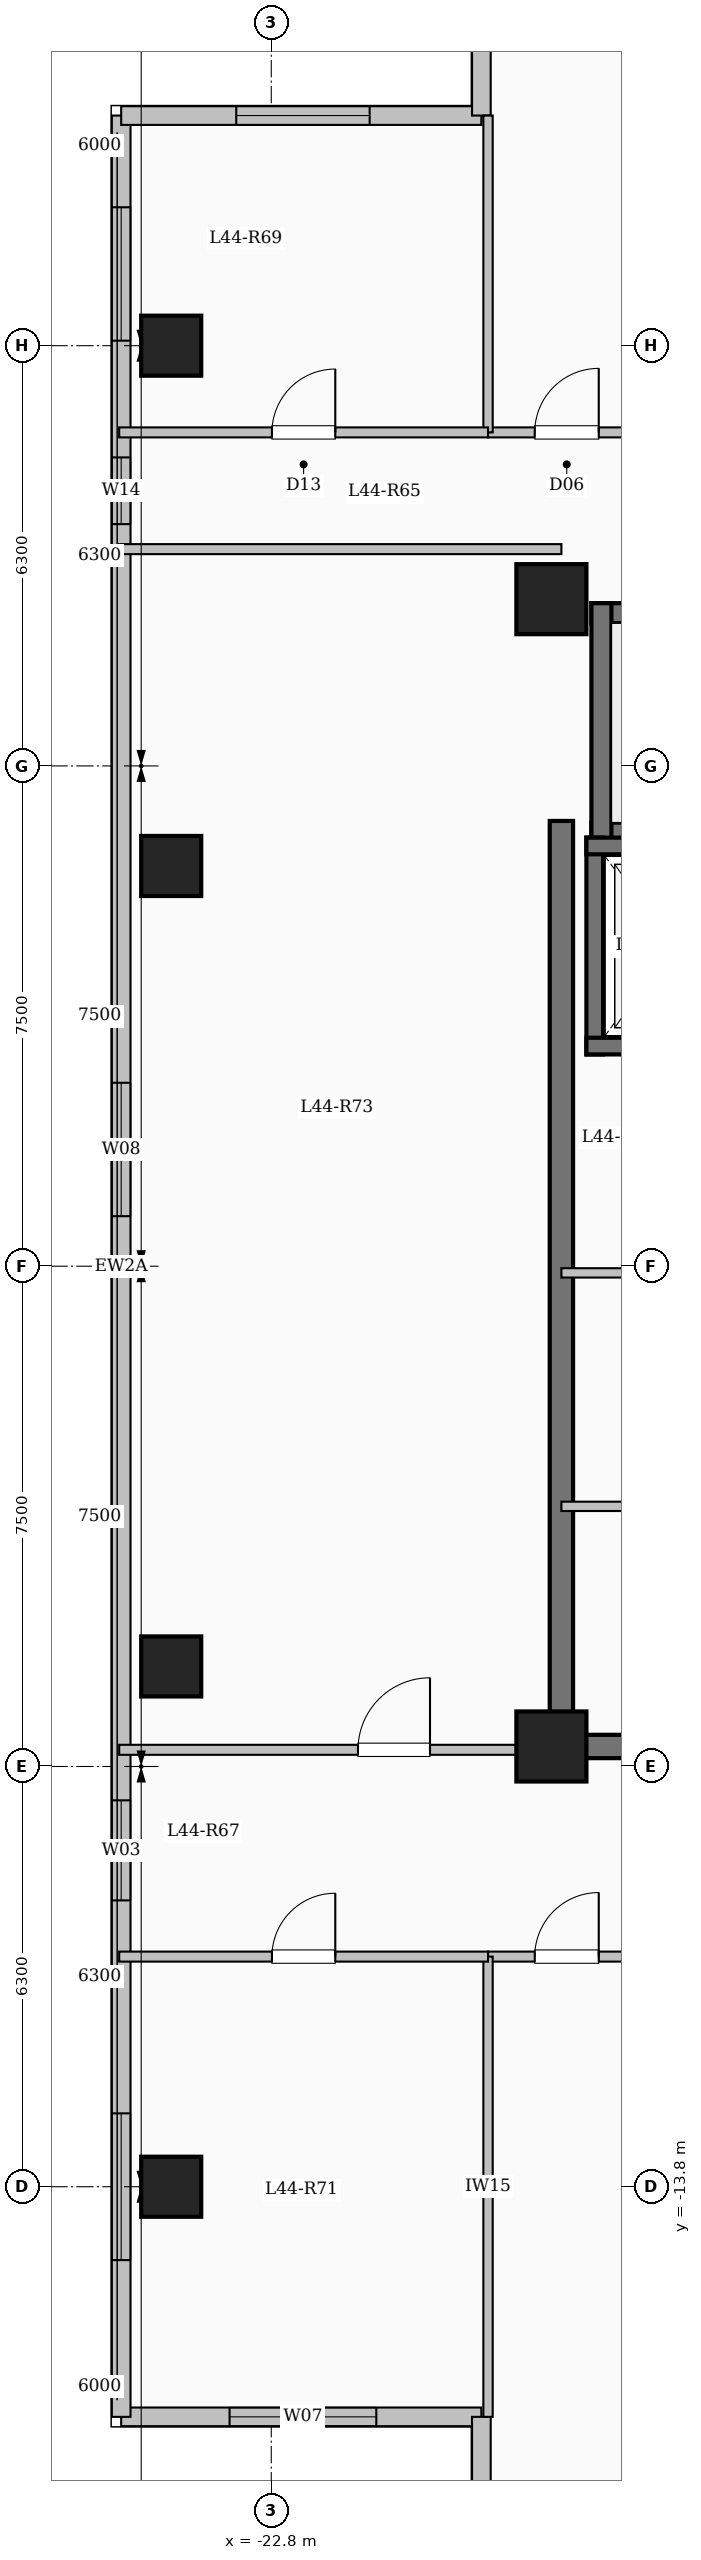
"""IFC4 building model, lengths in metres.
Left out: names, types, materials, properties, quantities, classifications, styles, units other than length and angle.
Written with IfcOpenShell. Run it as: python <this file> out.ifc"""

import sys

from ifc_helpers import new_model, si_unit, direction, frame, frame_2d, origin, origin_2d, place, context, subcontext, project, spatial, rectangle, extrude, element, fill, save


model = new_model("IFC4")
c1 = context("Model", 3, precision=1e-05, world=origin(), true_north=direction((0.0, 1.0)))
c2 = subcontext(c1, "Body", "Model", "MODEL_VIEW")
j1 = project(units=[si_unit("LENGTHUNIT", "METRE"), si_unit("PLANEANGLEUNIT", "RADIAN")], contexts=[c1])
p1 = place(None, origin())
s1 = spatial("IfcSite", under=j1, at=p1, CompositionType="ELEMENT")
p2 = place(p1, origin())
s2 = spatial("IfcBuilding", under=s1, at=p2, CompositionType="ELEMENT")
p3 = place(p2, frame((0.0, 0.0, 162.75)))
s3 = spatial("IfcBuildingStorey", under=s2, at=p3, CompositionType="ELEMENT", Elevation=162.75)
for number, where, z_axis, x_axis in (
    (1, (-18.6, -7.2, 0.0), (0.0, 0.0, 1.0), (1.0, 0.0, 0.0)),
    (2, (-18.6, 10.0, 0.0), (0.0, 0.0, 1.0), (1.0, 0.0, 0.0)),
):
    element("IfcColumn", number, at=place(p3, frame(where, z_axis=z_axis, x_axis=x_axis)), inside=s3, PredefinedType="COLUMN", context=c2, shape_type="SweptSolid", body=[
        extrude(rectangle(XDim=1.05, YDim=1.05, at=origin_2d()), origin(), (0.0, 0.0, 1.0), 3.35),
    ])
for number, where, z_axis, x_axis in (
    (3, (-24.3, -13.8, 0.0), (0.0, 0.0, 1.0), (1.0, 0.0, 0.0)),
    (4, (-24.3, -6.0, 0.0), (0.0, 0.0, 1.0), (1.0, 0.0, 0.0)),
    (5, (-24.3, 6.0, 0.0), (0.0, 0.0, 1.0), (1.0, 0.0, 0.0)),
    (6, (-24.3, 13.8, 0.0), (0.0, 0.0, 1.0), (1.0, 0.0, 0.0)),
):
    element("IfcColumn", number, at=place(p3, frame(where, z_axis=z_axis, x_axis=x_axis)), inside=s3, PredefinedType="COLUMN", context=c2, shape_type="SweptSolid", body=[
        extrude(rectangle(XDim=0.9, YDim=0.9, at=origin_2d()), origin(), (0.0, 0.0, 1.0), 3.35),
    ])
p4 = place(p3, frame((-19.65, -17.25, 0.0), z_axis=(0.0, 0.0, 1.0), x_axis=(-1.0, 0.0, 0.0)))
e7 = element("IfcWall", 7, at=p4, inside=s3, PredefinedType="SOLIDWALL", context=c2, shape_type="SweptSolid", body=[
    extrude(rectangle(XDim=5.4, YDim=0.28, at=frame_2d((2.7, 0.0))), origin(), (0.0, 0.0, 1.0), 3.1),
])
p5 = place(p4, frame((1.575, 0.0, 0.9)))
e8 = element("IfcOpeningElement", 8, at=p5, cuts=e7, PredefinedType="OPENING", context=c2, shape_type="SweptSolid", body=[
    extrude(rectangle(XDim=2.2, YDim=1.75, at=frame_2d((1.1, 0.875))), frame((0.0, 0.15, 0.0), z_axis=(0.0, -1.0, 0.0), x_axis=(1.0, 0.0, 0.0)), (0.0, 0.0, 1.0), 0.3),
])
p6 = place(p3, frame((-25.05, -17.25, 0.0), z_axis=(0.0, 0.0, 1.0), x_axis=(0.0, 1.0, 0.0)))
e9 = element("IfcWall", 9, at=p6, inside=s3, PredefinedType="SOLIDWALL", context=c2, shape_type="SweptSolid", body=[
    extrude(rectangle(XDim=34.5, YDim=0.28, at=frame_2d((17.25, 0.0))), origin(), (0.0, 0.0, 1.0), 3.1),
])
p7 = place(p6, frame((2.35, 0.0, 0.9)))
e10 = element("IfcOpeningElement", 10, at=p7, cuts=e9, PredefinedType="OPENING", context=c2, shape_type="SweptSolid", body=[
    extrude(rectangle(XDim=2.2, YDim=1.75, at=frame_2d((1.1, 0.875))), frame((0.0, 0.15, 0.0), z_axis=(0.0, -1.0, 0.0), x_axis=(1.0, 0.0, 0.0)), (0.0, 0.0, 1.0), 0.3),
])
p8 = place(p6, frame((7.742, 0.0, 0.9)))
e11 = element("IfcOpeningElement", 11, at=p8, cuts=e9, PredefinedType="OPENING", context=c2, shape_type="SweptSolid", body=[
    extrude(rectangle(XDim=1.5, YDim=1.65, at=frame_2d((0.75, 0.825))), frame((0.0, 0.15, 0.0), z_axis=(0.0, -1.0, 0.0), x_axis=(1.0, 0.0, 0.0)), (0.0, 0.0, 1.0), 0.3),
])
p9 = place(p6, frame((18.0, 0.0, 0.9)))
e12 = element("IfcOpeningElement", 12, at=p9, cuts=e9, PredefinedType="OPENING", context=c2, shape_type="SweptSolid", body=[
    extrude(rectangle(XDim=2.0, YDim=1.7, at=frame_2d((1.0, 0.85))), frame((0.0, 0.15, 0.0), z_axis=(0.0, -1.0, 0.0), x_axis=(1.0, 0.0, 0.0)), (0.0, 0.0, 1.0), 0.3),
])
p10 = place(p6, frame((28.375, 0.0, 0.95)))
e13 = element("IfcOpeningElement", 13, at=p10, cuts=e9, PredefinedType="OPENING", context=c2, shape_type="SweptSolid", body=[
    extrude(rectangle(XDim=1.0, YDim=1.5, at=frame_2d((0.5, 0.75))), frame((0.0, 0.15, 0.0), z_axis=(0.0, -1.0, 0.0), x_axis=(1.0, 0.0, 0.0)), (0.0, 0.0, 1.0), 0.3),
])
p11 = place(p6, frame((31.125, 0.0, 0.9)))
e14 = element("IfcOpeningElement", 14, at=p11, cuts=e9, PredefinedType="OPENING", context=c2, shape_type="SweptSolid", body=[
    extrude(rectangle(XDim=2.0, YDim=1.7, at=frame_2d((1.0, 0.85))), frame((0.0, 0.15, 0.0), z_axis=(0.0, -1.0, 0.0), x_axis=(1.0, 0.0, 0.0)), (0.0, 0.0, 1.0), 0.3),
])
p12 = place(p3, frame((-25.05, 17.25, 0.0), z_axis=(0.0, 0.0, 1.0), x_axis=(1.0, 0.0, 0.0)))
e15 = element("IfcWall", 15, at=p12, inside=s3, PredefinedType="SOLIDWALL", context=c2, shape_type="SweptSolid", body=[
    extrude(rectangle(XDim=5.4, YDim=0.28, at=frame_2d((2.7, 0.0))), origin(), (0.0, 0.0, 1.0), 3.1),
])
p13 = place(p12, frame((1.725, 0.0, 0.9)))
e16 = element("IfcOpeningElement", 16, at=p13, cuts=e15, PredefinedType="OPENING", context=c2, shape_type="SweptSolid", body=[
    extrude(rectangle(XDim=2.0, YDim=1.7, at=frame_2d((1.0, 0.85))), frame((0.0, 0.15, 0.0), z_axis=(0.0, -1.0, 0.0), x_axis=(1.0, 0.0, 0.0)), (0.0, 0.0, 1.0), 0.3),
])
p14 = place(p3, frame((-19.65, 17.25, 0.0), z_axis=(0.0, 0.0, 1.0), x_axis=(0.0, 1.0, 0.0)))
e17 = element("IfcWall", 17, at=p14, inside=s3, PredefinedType="SOLIDWALL", context=c2, shape_type="SweptSolid", body=[
    extrude(rectangle(XDim=3.9, YDim=0.28, at=frame_2d((1.95, 0.0))), origin(), (0.0, 0.0, 1.0), 3.1),
])
p15 = place(p14, frame((1.107, 0.0, 0.9)))
e18 = element("IfcOpeningElement", 18, at=p15, cuts=e17, PredefinedType="OPENING", context=c2, shape_type="SweptSolid", body=[
    extrude(rectangle(XDim=1.65, YDim=1.6, at=frame_2d((0.825, 0.8))), frame((0.0, 0.15, 0.0), z_axis=(0.0, -1.0, 0.0), x_axis=(1.0, 0.0, 0.0)), (0.0, 0.0, 1.0), 0.3),
])
p16 = place(p3, frame((-19.65, -21.15, 0.0), z_axis=(0.0, 0.0, 1.0), x_axis=(0.0, 1.0, 0.0)))
e19 = element("IfcWall", 19, at=p16, inside=s3, PredefinedType="SOLIDWALL", context=c2, shape_type="SweptSolid", body=[
    extrude(rectangle(XDim=3.9, YDim=0.28, at=frame_2d((1.95, 0.0))), origin(), (0.0, 0.0, 1.0), 3.1),
])
p17 = place(p16, frame((1.143, 0.0, 0.9)))
e20 = element("IfcOpeningElement", 20, at=p17, cuts=e19, PredefinedType="OPENING", context=c2, shape_type="SweptSolid", body=[
    extrude(rectangle(XDim=1.65, YDim=1.6, at=frame_2d((0.825, 0.8))), frame((0.0, 0.15, 0.0), z_axis=(0.0, -1.0, 0.0), x_axis=(1.0, 0.0, 0.0)), (0.0, 0.0, 1.0), 0.3),
])
p18 = place(p3, frame((-18.0, 9.79, 0.0), z_axis=(0.0, 0.0, 1.0), x_axis=(1.0, 0.0, 0.0)))
e21 = element("IfcWall", 21, at=p18, inside=s3, PredefinedType="SHEAR", context=c2, shape_type="SweptSolid", body=[
    extrude(rectangle(XDim=8.0, YDim=0.3, at=frame_2d((4.0, 0.0))), origin(), (0.0, 0.0, 1.0), 3.35),
])
p19 = place(p3, frame((-18.0, 6.5, 0.0), z_axis=(0.0, 0.0, 1.0), x_axis=(1.0, 0.0, 0.0)))
e22 = element("IfcWall", 22, at=p19, inside=s3, PredefinedType="SHEAR", context=c2, shape_type="SweptSolid", body=[
    extrude(rectangle(XDim=8.0, YDim=0.3, at=frame_2d((4.0, 0.0))), origin(), (0.0, 0.0, 1.0), 3.35),
])
p20 = place(p19, frame((6.45, 0.0, 0.0)))
e23 = element("IfcOpeningElement", 23, at=p20, cuts=e22, PredefinedType="OPENING", context=c2, shape_type="SweptSolid", body=[
    extrude(rectangle(XDim=1.0, YDim=2.15, at=frame_2d((0.5, 1.075))), frame((0.0, 0.16, 0.0), z_axis=(0.0, -1.0, 0.0), x_axis=(1.0, 0.0, 0.0)), (0.0, 0.0, 1.0), 0.32),
])
p21 = place(p3, frame((-17.85, 6.35, 0.0), z_axis=(0.0, 0.0, 1.0), x_axis=(0.0, 1.0, 0.0)))
e24 = element("IfcWall", 24, at=p21, inside=s3, PredefinedType="SHEAR", context=c2, shape_type="SweptSolid", body=[
    extrude(rectangle(XDim=3.59, YDim=0.3, at=frame_2d((1.795, 0.0))), origin(), (0.0, 0.0, 1.0), 3.35),
])
p22 = place(p3, frame((-17.95, 3.175, 0.0), z_axis=(0.0, 0.0, 1.0), x_axis=(0.0, 1.0, 0.0)))
e25 = element("IfcWall", 25, at=p22, inside=s3, PredefinedType="SHEAR", context=c2, shape_type="SweptSolid", body=[
    extrude(rectangle(XDim=3.25, YDim=0.25, at=frame_2d((1.625, 0.0))), origin(), (0.0, 0.0, 1.0), 3.35),
])
for number, where, z_axis, x_axis in (
    (26, (-18.075, 3.3, 0.0), (0.0, 0.0, 1.0), (1.0, 0.0, 0.0)),
    (27, (-18.075, 6.3, 0.0), (0.0, 0.0, 1.0), (1.0, 0.0, 0.0)),
):
    element("IfcWall", number, at=place(p3, frame(where, z_axis=z_axis, x_axis=x_axis)), inside=s3, PredefinedType="SHEAR", context=c2, shape_type="SweptSolid", body=[
        extrude(rectangle(XDim=2.55, YDim=0.25, at=frame_2d((1.275, 0.0))), origin(), (0.0, 0.0, 1.0), 3.35),
    ])
p23 = place(p3, frame((-18.45, -7.375, 0.0), z_axis=(0.0, 0.0, 1.0), x_axis=(0.0, 1.0, 0.0)))
e28 = element("IfcWall", 28, at=p23, inside=s3, PredefinedType="SHEAR", context=c2, shape_type="SweptSolid", body=[
    extrude(rectangle(XDim=14.05, YDim=0.35, at=frame_2d((7.025, 0.0))), origin(), (0.0, 0.0, 1.0), 3.35),
])
p24 = place(p3, frame((-18.625, -7.2, 0.0), z_axis=(0.0, 0.0, 1.0), x_axis=(1.0, 0.0, 0.0)))
e29 = element("IfcWall", 29, at=p24, inside=s3, PredefinedType="SHEAR", context=c2, shape_type="SweptSolid", body=[
    extrude(rectangle(XDim=8.55, YDim=0.35, at=frame_2d((4.275, 0.0))), origin(), (0.0, 0.0, 1.0), 3.35),
])
p25 = place(p3, frame((-18.45, -3.6, 0.0), z_axis=(0.0, 0.0, 1.0), x_axis=(1.0, 0.0, 0.0)))
e30 = element("IfcWall", 30, at=p25, inside=s3, PredefinedType="PARTITIONING", context=c2, shape_type="SweptSolid", body=[
    extrude(rectangle(XDim=3.05, YDim=0.14, at=frame_2d((1.525, 0.0))), origin(), (0.0, 0.0, 1.0), 3.1),
])
p26 = place(p25, frame((1.05, 0.0, 0.0)))
e31 = element("IfcOpeningElement", 31, at=p26, cuts=e30, PredefinedType="OPENING", context=c2, shape_type="SweptSolid", body=[
    extrude(rectangle(XDim=0.9, YDim=2.08, at=frame_2d((0.45, 1.04))), frame((0.0, 0.08, 0.0), z_axis=(0.0, -1.0, 0.0), x_axis=(1.0, 0.0, 0.0)), (0.0, 0.0, 1.0), 0.16),
])
p27 = place(p3, frame((-18.45, -0.1, 0.0), z_axis=(0.0, 0.0, 1.0), x_axis=(1.0, 0.0, 0.0)))
e32 = element("IfcWall", 32, at=p27, inside=s3, PredefinedType="PARTITIONING", context=c2, shape_type="SweptSolid", body=[
    extrude(rectangle(XDim=3.05, YDim=0.14, at=frame_2d((1.525, 0.0))), origin(), (0.0, 0.0, 1.0), 3.1),
])
p28 = place(p27, frame((1.05, 0.0, 0.0)))
e33 = element("IfcOpeningElement", 33, at=p28, cuts=e32, PredefinedType="OPENING", context=c2, shape_type="SweptSolid", body=[
    extrude(rectangle(XDim=0.9, YDim=2.08, at=frame_2d((0.45, 1.04))), frame((0.0, 0.08, 0.0), z_axis=(0.0, -1.0, 0.0), x_axis=(1.0, 0.0, 0.0)), (0.0, 0.0, 1.0), 0.16),
])
p29 = place(p3, frame((-19.55, 12.5, 0.0), z_axis=(0.0, 0.0, 1.0), x_axis=(1.0, 0.0, 0.0)))
e34 = element("IfcWall", 34, at=p29, inside=s3, PredefinedType="PARTITIONING", context=c2, shape_type="SweptSolid", body=[
    extrude(rectangle(XDim=15.7, YDim=0.15, at=frame_2d((7.85, 0.0))), origin(), (0.0, 0.0, 1.0), 3.1),
])
p30 = place(p29, frame((0.7, 0.0, 0.0)))
e35 = element("IfcOpeningElement", 35, at=p30, cuts=e34, PredefinedType="OPENING", context=c2, shape_type="SweptSolid", body=[
    extrude(rectangle(XDim=0.96, YDim=2.15, at=frame_2d((0.48, 1.075))), frame((0.0, 0.085, 0.0), z_axis=(0.0, -1.0, 0.0), x_axis=(1.0, 0.0, 0.0)), (0.0, 0.0, 1.0), 0.17),
])
p31 = place(p3, frame((-19.55, -10.35, 0.0), z_axis=(0.0, 0.0, 1.0), x_axis=(1.0, 0.0, 0.0)))
e36 = element("IfcWall", 36, at=p31, inside=s3, PredefinedType="PARTITIONING", context=c2, shape_type="SweptSolid", body=[
    extrude(rectangle(XDim=11.0, YDim=0.15, at=frame_2d((5.5, 0.0))), origin(), (0.0, 0.0, 1.0), 3.1),
])
p32 = place(p31, frame((0.7, 0.0, 0.0)))
e37 = element("IfcOpeningElement", 37, at=p32, cuts=e36, PredefinedType="OPENING", context=c2, shape_type="SweptSolid", body=[
    extrude(rectangle(XDim=0.96, YDim=2.15, at=frame_2d((0.48, 1.075))), frame((0.0, 0.085, 0.0), z_axis=(0.0, -1.0, 0.0), x_axis=(1.0, 0.0, 0.0)), (0.0, 0.0, 1.0), 0.17),
])
p33 = place(p3, frame((-25.08, -7.25, 0.0), z_axis=(0.0, 0.0, 1.0), x_axis=(1.0, 0.0, 0.0)))
e38 = element("IfcWall", 38, at=p33, inside=s3, PredefinedType="PARTITIONING", context=c2, shape_type="SweptSolid", body=[
    extrude(rectangle(XDim=6.63, YDim=0.15, at=frame_2d((3.315, 0.0))), origin(), (0.0, 0.0, 1.0), 3.1),
])
p34 = place(p33, frame((3.58, 0.0, 0.0)))
e39 = element("IfcOpeningElement", 39, at=p34, cuts=e38, PredefinedType="OPENING", context=c2, shape_type="SweptSolid", body=[
    extrude(rectangle(XDim=1.08, YDim=2.15, at=frame_2d((0.54, 1.075))), frame((0.0, 0.085, 0.0), z_axis=(0.0, -1.0, 0.0), x_axis=(1.0, 0.0, 0.0)), (0.0, 0.0, 1.0), 0.17),
])
p35 = place(p3, frame((-25.08, 10.75, 0.0), z_axis=(0.0, 0.0, 1.0), x_axis=(1.0, 0.0, 0.0)))
e40 = element("IfcWall", 40, at=p35, inside=s3, PredefinedType="PARTITIONING", context=c2, shape_type="SweptSolid", body=[
    extrude(rectangle(XDim=6.63, YDim=0.15, at=frame_2d((3.315, 0.0))), origin(), (0.0, 0.0, 1.0), 3.1),
])
p36 = place(p3, frame((-19.55, -17.25, 0.0), z_axis=(0.0, 0.0, 1.0), x_axis=(0.0, 1.0, 0.0)))
e41 = element("IfcWall", 41, at=p36, inside=s3, PredefinedType="PARTITIONING", context=c2, shape_type="SweptSolid", body=[
    extrude(rectangle(XDim=6.9, YDim=0.14, at=frame_2d((3.45, 0.0))), origin(), (0.0, 0.0, 1.0), 3.1),
])
p37 = place(p3, frame((-19.55, 12.5, 0.0), z_axis=(0.0, 0.0, 1.0), x_axis=(0.0, 1.0, 0.0)))
e42 = element("IfcWall", 42, at=p37, inside=s3, PredefinedType="PARTITIONING", context=c2, shape_type="SweptSolid", body=[
    extrude(rectangle(XDim=4.75, YDim=0.14, at=frame_2d((2.375, 0.0))), origin(), (0.0, 0.0, 1.0), 3.1),
])
p38 = place(p3, frame((-25.08, 12.5, 0.0), z_axis=(0.0, 0.0, 1.0), x_axis=(1.0, 0.0, 0.0)))
e43 = element("IfcWall", 43, at=p38, inside=s3, PredefinedType="PARTITIONING", context=c2, shape_type="SweptSolid", body=[
    extrude(rectangle(XDim=5.53, YDim=0.15, at=frame_2d((2.765, 0.0))), origin(), (0.0, 0.0, 1.0), 3.1),
])
p39 = place(p38, frame((2.29, 0.0, 0.0)))
e44 = element("IfcOpeningElement", 44, at=p39, cuts=e43, PredefinedType="OPENING", context=c2, shape_type="SweptSolid", body=[
    extrude(rectangle(XDim=0.95, YDim=2.15, at=frame_2d((0.475, 1.075))), frame((0.0, 0.085, 0.0), z_axis=(0.0, -1.0, 0.0), x_axis=(1.0, 0.0, 0.0)), (0.0, 0.0, 1.0), 0.17),
])
p40 = place(p3, frame((-25.08, -10.35, 0.0), z_axis=(0.0, 0.0, 1.0), x_axis=(1.0, 0.0, 0.0)))
e45 = element("IfcWall", 45, at=p40, inside=s3, PredefinedType="PARTITIONING", context=c2, shape_type="SweptSolid", body=[
    extrude(rectangle(XDim=5.53, YDim=0.15, at=frame_2d((2.765, 0.0))), origin(), (0.0, 0.0, 1.0), 3.1),
])
p41 = place(p40, frame((2.29, 0.0, 0.0)))
e46 = element("IfcOpeningElement", 46, at=p41, cuts=e45, PredefinedType="OPENING", context=c2, shape_type="SweptSolid", body=[
    extrude(rectangle(XDim=0.95, YDim=2.15, at=frame_2d((0.475, 1.075))), frame((0.0, 0.085, 0.0), z_axis=(0.0, -1.0, 0.0), x_axis=(1.0, 0.0, 0.0)), (0.0, 0.0, 1.0), 0.17),
])
p42 = place(p5, origin())
e47 = element("IfcWindow", 47, at=p42, inside=s3, PartitioningType="SINGLE_PANEL", PredefinedType="WINDOW", context=c2, shape_type="SweptSolid", body=[
    extrude(rectangle(XDim=2.2, YDim=1.75, at=frame_2d((1.1, 0.875))), frame((0.0, 0.03, 0.0), z_axis=(0.0, -1.0, 0.0), x_axis=(1.0, 0.0, 0.0)), (0.0, 0.0, 1.0), 0.06),
])
fill(e8, e47)
p43 = place(p7, origin())
e48 = element("IfcWindow", 48, at=p43, inside=s3, PartitioningType="SINGLE_PANEL", PredefinedType="WINDOW", context=c2, shape_type="SweptSolid", body=[
    extrude(rectangle(XDim=2.2, YDim=1.75, at=frame_2d((1.1, 0.875))), frame((0.0, 0.03, 0.0), z_axis=(0.0, -1.0, 0.0), x_axis=(1.0, 0.0, 0.0)), (0.0, 0.0, 1.0), 0.06),
])
fill(e10, e48)
p44 = place(p8, origin())
e49 = element("IfcWindow", 49, at=p44, inside=s3, PartitioningType="SINGLE_PANEL", PredefinedType="WINDOW", context=c2, shape_type="SweptSolid", body=[
    extrude(rectangle(XDim=1.5, YDim=1.65, at=frame_2d((0.75, 0.825))), frame((0.0, 0.03, 0.0), z_axis=(0.0, -1.0, 0.0), x_axis=(1.0, 0.0, 0.0)), (0.0, 0.0, 1.0), 0.06),
])
fill(e11, e49)
p45 = place(p9, origin())
e50 = element("IfcWindow", 50, at=p45, inside=s3, PartitioningType="SINGLE_PANEL", PredefinedType="WINDOW", context=c2, shape_type="SweptSolid", body=[
    extrude(rectangle(XDim=2.0, YDim=1.7, at=frame_2d((1.0, 0.85))), frame((0.0, 0.03, 0.0), z_axis=(0.0, -1.0, 0.0), x_axis=(1.0, 0.0, 0.0)), (0.0, 0.0, 1.0), 0.06),
])
fill(e12, e50)
p46 = place(p10, origin())
e51 = element("IfcWindow", 51, at=p46, inside=s3, PartitioningType="SINGLE_PANEL", PredefinedType="WINDOW", context=c2, shape_type="SweptSolid", body=[
    extrude(rectangle(XDim=1.0, YDim=1.5, at=frame_2d((0.5, 0.75))), frame((0.0, 0.03, 0.0), z_axis=(0.0, -1.0, 0.0), x_axis=(1.0, 0.0, 0.0)), (0.0, 0.0, 1.0), 0.06),
])
fill(e13, e51)
p47 = place(p11, origin())
e52 = element("IfcWindow", 52, at=p47, inside=s3, PartitioningType="SINGLE_PANEL", PredefinedType="WINDOW", context=c2, shape_type="SweptSolid", body=[
    extrude(rectangle(XDim=2.0, YDim=1.7, at=frame_2d((1.0, 0.85))), frame((0.0, 0.03, 0.0), z_axis=(0.0, -1.0, 0.0), x_axis=(1.0, 0.0, 0.0)), (0.0, 0.0, 1.0), 0.06),
])
fill(e14, e52)
p48 = place(p13, origin())
e53 = element("IfcWindow", 53, at=p48, inside=s3, PartitioningType="SINGLE_PANEL", PredefinedType="WINDOW", context=c2, shape_type="SweptSolid", body=[
    extrude(rectangle(XDim=2.0, YDim=1.7, at=frame_2d((1.0, 0.85))), frame((0.0, 0.03, 0.0), z_axis=(0.0, -1.0, 0.0), x_axis=(1.0, 0.0, 0.0)), (0.0, 0.0, 1.0), 0.06),
])
fill(e16, e53)
p49 = place(p30, origin())
e54 = element("IfcDoor", 54, at=p49, inside=s3, OperationType="SINGLE_SWING_RIGHT", PredefinedType="DOOR", context=c2, shape_type="SweptSolid", body=[
    extrude(rectangle(XDim=0.96, YDim=2.15, at=frame_2d((0.48, 1.075))), frame((0.0, 0.025, 0.0), z_axis=(0.0, -1.0, 0.0), x_axis=(1.0, 0.0, 0.0)), (0.0, 0.0, 1.0), 0.05),
])
fill(e35, e54)
p50 = place(p32, origin())
e55 = element("IfcDoor", 55, at=p50, inside=s3, OperationType="SINGLE_SWING_RIGHT", PredefinedType="DOOR", context=c2, shape_type="SweptSolid", body=[
    extrude(rectangle(XDim=0.96, YDim=2.15, at=frame_2d((0.48, 1.075))), frame((0.0, 0.025, 0.0), z_axis=(0.0, -1.0, 0.0), x_axis=(1.0, 0.0, 0.0)), (0.0, 0.0, 1.0), 0.05),
])
fill(e37, e55)
p51 = place(p39, origin())
e56 = element("IfcDoor", 56, at=p51, inside=s3, OperationType="SINGLE_SWING_RIGHT", PredefinedType="DOOR", context=c2, shape_type="SweptSolid", body=[
    extrude(rectangle(XDim=0.95, YDim=2.15, at=frame_2d((0.475, 1.075))), frame((0.0, 0.025, 0.0), z_axis=(0.0, -1.0, 0.0), x_axis=(1.0, 0.0, 0.0)), (0.0, 0.0, 1.0), 0.05),
])
fill(e44, e56)
p52 = place(p41, origin())
e57 = element("IfcDoor", 57, at=p52, inside=s3, OperationType="SINGLE_SWING_RIGHT", PredefinedType="DOOR", context=c2, shape_type="SweptSolid", body=[
    extrude(rectangle(XDim=0.95, YDim=2.15, at=frame_2d((0.475, 1.075))), frame((0.0, 0.025, 0.0), z_axis=(0.0, -1.0, 0.0), x_axis=(1.0, 0.0, 0.0)), (0.0, 0.0, 1.0), 0.05),
])
fill(e46, e57)
p53 = place(p34, origin())
e58 = element("IfcDoor", 58, at=p53, inside=s3, OperationType="SINGLE_SWING_RIGHT", PredefinedType="DOOR", context=c2, shape_type="SweptSolid", body=[
    extrude(rectangle(XDim=1.08, YDim=2.15, at=frame_2d((0.54, 1.075))), frame((0.0, 0.025, 0.0), z_axis=(0.0, -1.0, 0.0), x_axis=(1.0, 0.0, 0.0)), (0.0, 0.0, 1.0), 0.05),
])
fill(e39, e58)
save(model, sys.argv[1])
